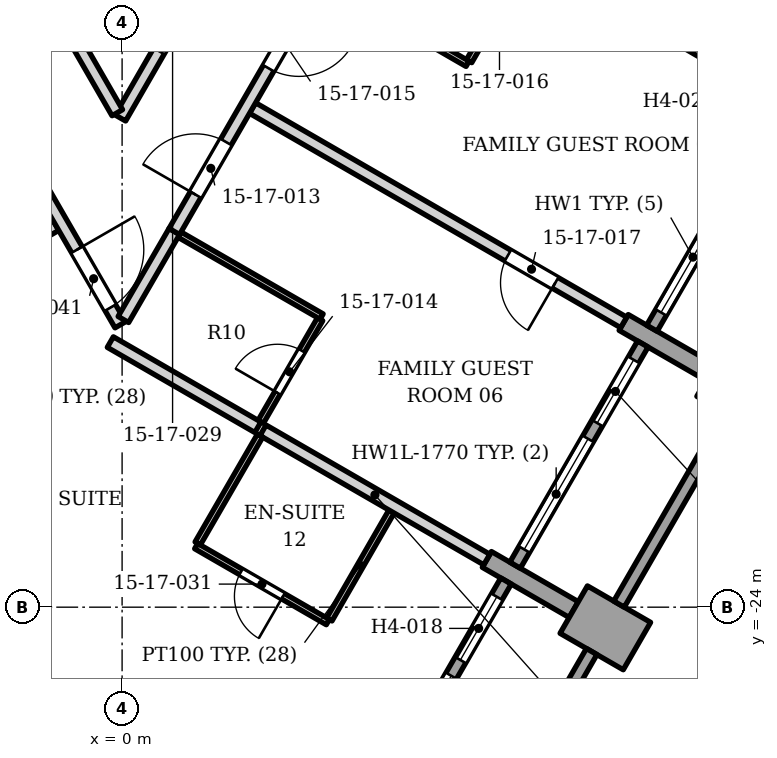
"""IFC4 building model, lengths in metres.
Left out: names, types, materials, properties, quantities, classifications, styles, units other than length and angle.
Written with IfcOpenShell. Run it as: python <this file> out.ifc"""

import sys

from ifc_helpers import new_model, si_unit, direction, frame, frame_2d, origin, origin_2d, place, context, subcontext, project, spatial, polyline, rectangle, outline, extrude, element, fill, save


model = new_model("IFC4")
c1 = context("Model", 3, precision=1e-05, world=origin(), true_north=direction((0.0, 1.0)))
c2 = subcontext(c1, "Body", "Model", "MODEL_VIEW")
j1 = project(units=[si_unit("LENGTHUNIT", "METRE"), si_unit("PLANEANGLEUNIT", "RADIAN")], contexts=[c1])
p1 = place(None, origin())
s1 = spatial("IfcSite", under=j1, at=p1, CompositionType="ELEMENT")
p2 = place(p1, origin())
s2 = spatial("IfcBuilding", under=s1, at=p2, CompositionType="ELEMENT")
p3 = place(p2, frame((0.0, 0.0, 76.6)))
s3 = spatial("IfcBuildingStorey", under=s2, at=p3, CompositionType="ELEMENT", Elevation=76.6)
p4 = place(p3, frame((10.197, -20.443, 0.0), z_axis=(0.0, 0.0, 1.0), x_axis=(0.5, 0.866025403784, 0.0)))
e1 = element("IfcColumn", 1, at=p4, inside=s3, PredefinedType="COLUMN", context=c2, shape_type="SweptSolid", body=[
    extrude(rectangle(XDim=0.9, YDim=1.2, at=origin_2d()), origin(), (0.0, 0.0, 1.0), 3.4),
])
p5 = place(p3, frame((8.467, -24.64, 0.0), z_axis=(0.0, 0.0, 1.0), x_axis=(-0.865955154139, 0.50012165622, 0.0)))
e2 = element("IfcWall", 2, at=p5, inside=s3, PredefinedType="SOLIDWALL", context=c2, shape_type="SweptSolid", body=[
    extrude(rectangle(XDim=1.2, YDim=0.9, at=frame_2d((0.6, 0.0))), origin(), (0.0, 0.0, 1.0), 2.63),
])
p6 = place(p3, frame((7.428, -24.04, 0.0), z_axis=(0.0, 0.0, 1.0), x_axis=(-0.866040211805, 0.499974350878, 0.0)))
e3 = element("IfcWall", 3, at=p6, inside=s3, PredefinedType="SOLIDWALL", context=c2, shape_type="SweptSolid", body=[
    extrude(rectangle(XDim=1.65, YDim=0.3, at=frame_2d((0.825, 0.0))), origin(), (0.0, 0.0, 1.0), 2.473),
])
p7 = place(p3, frame((9.678, -20.143, 0.0), z_axis=(0.0, 0.0, 1.0), x_axis=(-0.866003217194, 0.500038426333, 0.0)))
e4 = element("IfcWall", 4, at=p7, inside=s3, PredefinedType="SOLIDWALL", context=c2, shape_type="SweptSolid", body=[
    extrude(rectangle(XDim=1.65, YDim=0.3, at=frame_2d((0.825, 0.0))), origin(), (0.0, 0.0, 1.0), 2.628),
])
p8 = place(p3, frame((5.922, -27.847, 0.0), z_axis=(0.0, 0.0, 1.0), x_axis=(0.500012057535, 0.866018442252, 0.0)))
e5 = element("IfcWall", 5, at=p8, inside=s3, PredefinedType="SOLIDWALL", context=c2, shape_type="SweptSolid", body=[
    extrude(rectangle(XDim=3.6, YDim=0.2, at=frame_2d((1.8, 0.0))), origin(), (0.0, 0.0, 1.0), 2.63),
])
p9 = place(p3, frame((4.214, -27.207, 0.0), z_axis=(0.0, 0.0, 1.0), x_axis=(0.500027713859, 0.866009402589, 0.0)))
e6 = element("IfcWall", 6, at=p9, inside=s3, PredefinedType="ELEMENTEDWALL", context=c2, shape_type="SweptSolid", body=[
    extrude(rectangle(XDim=4.2, YDim=0.2, at=frame_2d((2.1, 0.0))), origin(), (0.0, 0.0, 1.0), 2.45),
])
p10 = place(p9, frame((0.3, 0.0, 0.6)))
e7 = element("IfcOpeningElement", 7, at=p10, cuts=e6, PredefinedType="OPENING", context=c2, shape_type="SweptSolid", body=[
    extrude(rectangle(XDim=2.1, YDim=1.75, at=frame_2d((1.05, 0.875))), frame((0.0, 0.11, 0.0), z_axis=(0.0, -1.0, 0.0), x_axis=(1.0, 0.0, 0.0)), (0.0, 0.0, 1.0), 0.22),
])
p11 = place(p9, frame((2.7, 0.0, 0.0)))
e8 = element("IfcOpeningElement", 8, at=p11, cuts=e6, PredefinedType="OPENING", context=c2, shape_type="SweptSolid", body=[
    extrude(rectangle(XDim=1.2, YDim=2.35, at=frame_2d((0.6, 1.175))), frame((0.0, 0.11, 0.0), z_axis=(0.0, -1.0, 0.0), x_axis=(1.0, 0.0, 0.0)), (0.0, 0.0, 1.0), 0.22),
])
p12 = place(p3, origin())
e9 = element("IfcWall", 9, at=p12, inside=s3, PredefinedType="SOLIDWALL", context=c2, shape_type="SweptSolid", body=[
    extrude(outline(polyline([(8.259, -24.0), (10.059, -20.883), (9.885, -20.783), (8.086, -23.9), (8.259, -24.0)])), origin(), (0.0, 0.0, 1.0), 2.63),
])
p13 = place(p3, frame((6.464, -23.31, 0.0), z_axis=(0.0, 0.0, 1.0), x_axis=(0.500002543286, 0.866023935413, 0.0)))
e10 = element("IfcWall", 10, at=p13, inside=s3, PredefinedType="ELEMENTEDWALL", context=c2, shape_type="SweptSolid", body=[
    extrude(rectangle(XDim=4.2, YDim=0.2, at=frame_2d((2.1, 0.0))), origin(), (0.0, 0.0, 1.0), 2.473),
])
p14 = place(p13, frame((0.3, 0.0, 0.6)))
e11 = element("IfcOpeningElement", 11, at=p14, cuts=e10, PredefinedType="OPENING", context=c2, shape_type="SweptSolid", body=[
    extrude(rectangle(XDim=2.1, YDim=1.77, at=frame_2d((1.05, 0.885))), frame((0.0, 0.11, 0.0), z_axis=(0.0, -1.0, 0.0), x_axis=(1.0, 0.0, 0.0)), (0.0, 0.0, 1.0), 0.22),
])
p15 = place(p13, frame((2.7, 0.0, 0.0)))
e12 = element("IfcOpeningElement", 12, at=p15, cuts=e10, PredefinedType="OPENING", context=c2, shape_type="SweptSolid", body=[
    extrude(rectangle(XDim=1.2, YDim=2.37, at=frame_2d((0.6, 1.185))), frame((0.0, 0.11, 0.0), z_axis=(0.0, -1.0, 0.0), x_axis=(1.0, 0.0, 0.0)), (0.0, 0.0, 1.0), 0.22),
])
p16 = place(p3, frame((8.714, -19.413, 0.0), z_axis=(0.0, 0.0, 1.0), x_axis=(0.500027713859, 0.866009402589, 0.0)))
e13 = element("IfcWall", 13, at=p16, inside=s3, PredefinedType="ELEMENTEDWALL", context=c2, shape_type="SweptSolid", body=[
    extrude(rectangle(XDim=4.2, YDim=0.2, at=frame_2d((2.1, 0.0))), origin(), (0.0, 0.0, 1.0), 2.628),
])
p17 = place(p16, frame((0.3, 0.0, 0.6)))
e14 = element("IfcOpeningElement", 14, at=p17, cuts=e13, PredefinedType="OPENING", context=c2, shape_type="SweptSolid", body=[
    extrude(rectangle(XDim=2.1, YDim=1.8, at=frame_2d((1.05, 0.9))), frame((0.0, 0.11, 0.0), z_axis=(0.0, -1.0, 0.0), x_axis=(1.0, 0.0, 0.0)), (0.0, 0.0, 1.0), 0.22),
])
p18 = place(p16, frame((2.7, 0.0, 0.0)))
e15 = element("IfcOpeningElement", 15, at=p18, cuts=e13, PredefinedType="OPENING", context=c2, shape_type="SweptSolid", body=[
    extrude(rectangle(XDim=1.2, YDim=2.4, at=frame_2d((0.6, 1.2))), frame((0.0, 0.11, 0.0), z_axis=(0.0, -1.0, 0.0), x_axis=(1.0, 0.0, 0.0)), (0.0, 0.0, 1.0), 0.22),
])
p19 = place(p3, frame((3.408, -24.202, 0.0), z_axis=(0.0, 0.0, 1.0), x_axis=(0.499303169309, 0.866427345551, 0.0)))
e16 = element("IfcWall", 16, at=p19, inside=s3, PredefinedType="PARTITIONING", context=c2, shape_type="SweptSolid", body=[
    extrude(rectangle(XDim=2.05, YDim=0.1, at=frame_2d((1.025, 0.0))), origin(), (0.0, 0.0, 1.0), 2.384),
])
p20 = place(p3, frame((2.317, -21.091, 0.0), z_axis=(0.0, 0.0, 1.0), x_axis=(0.866014341725, -0.50001915956, 0.0)))
e17 = element("IfcWall", 17, at=p20, inside=s3, PredefinedType="PARTITIONING", context=c2, shape_type="SweptSolid", body=[
    extrude(rectangle(XDim=4.25, YDim=0.2, at=frame_2d((2.125, 0.0))), origin(), (0.0, 0.0, 1.0), 2.384),
])
p21 = place(p3, frame((1.218, -22.995, 0.0), z_axis=(0.0, 0.0, 1.0), x_axis=(0.866047370643, -0.499961950354, 0.0)))
e18 = element("IfcWall", 18, at=p21, inside=s3, PredefinedType="PARTITIONING", context=c2, shape_type="SweptSolid", body=[
    extrude(rectangle(XDim=2.5, YDim=0.1, at=frame_2d((1.25, 0.0))), origin(), (0.0, 0.0, 1.0), 2.384),
])
p22 = place(p21, frame((0.85, 0.0, 0.0)))
e19 = element("IfcOpeningElement", 19, at=p22, cuts=e18, PredefinedType="OPENING", context=c2, shape_type="SweptSolid", body=[
    extrude(rectangle(XDim=0.8, YDim=2.1, at=frame_2d((0.4, 1.05))), frame((0.0, 0.06, 0.0), z_axis=(0.0, -1.0, 0.0), x_axis=(1.0, 0.0, 0.0)), (0.0, 0.0, 1.0), 0.12),
])
p23 = place(p3, frame((1.243, -22.952, 0.0), z_axis=(0.0, 0.0, 1.0), x_axis=(0.500646589026, 0.865651773461, 0.0)))
e20 = element("IfcWall", 20, at=p23, inside=s3, PredefinedType="PARTITIONING", context=c2, shape_type="SweptSolid", body=[
    extrude(rectangle(XDim=2.05, YDim=0.1, at=frame_2d((1.025, 0.0))), origin(), (0.0, 0.0, 1.0), 2.384),
])
p24 = place(p3, frame((2.28, -20.952, 0.0), z_axis=(0.0, 0.0, 1.0), x_axis=(0.500675951608, 0.865634791053, 0.0)))
e21 = element("IfcWall", 21, at=p24, inside=s3, PredefinedType="PARTITIONING", context=c2, shape_type="SweptSolid", body=[
    extrude(rectangle(XDim=1.95, YDim=0.1, at=frame_2d((0.975, 0.0))), origin(), (0.0, 0.0, 1.0), 2.384),
])
p25 = place(p24, frame((0.55, 0.0, 0.0)))
e22 = element("IfcOpeningElement", 22, at=p25, cuts=e21, PredefinedType="OPENING", context=c2, shape_type="SweptSolid", body=[
    extrude(rectangle(XDim=0.8, YDim=2.1, at=frame_2d((0.4, 1.05))), frame((0.0, 0.06, 0.0), z_axis=(0.0, -1.0, 0.0), x_axis=(1.0, 0.0, 0.0)), (0.0, 0.0, 1.0), 0.12),
])
p26 = place(p3, frame((-5.81, -20.441, 0.0), z_axis=(0.0, 0.0, 1.0), x_axis=(0.866020710281, 0.500008129298, 0.0)))
e23 = element("IfcWall", 23, at=p26, inside=s3, PredefinedType="PARTITIONING", context=c2, shape_type="SweptSolid", body=[
    extrude(rectangle(XDim=5.45, YDim=0.2, at=frame_2d((2.725, 0.0))), origin(), (0.0, 0.0, 1.0), 2.384),
])
p27 = place(p3, frame((-0.193, -19.64, 0.0), z_axis=(0.0, 0.0, 1.0), x_axis=(0.866036131362, -0.49998141883, 0.0)))
e24 = element("IfcWall", 24, at=p27, inside=s3, PredefinedType="PARTITIONING", context=c2, shape_type="SweptSolid", body=[
    extrude(rectangle(XDim=2.802, YDim=0.2, at=frame_2d((1.401, 0.0))), origin(), (0.0, 0.0, 1.0), 2.384),
])
p28 = place(p3, frame((-11.206, 0.0, 0.0), z_axis=(0.0, 0.0, 1.0), x_axis=(0.500002959525, -0.866023695095, 0.0)))
e25 = element("IfcWall", 25, at=p28, inside=s3, PredefinedType="PARTITIONING", context=c2, shape_type="SweptSolid", body=[
    extrude(rectangle(XDim=22.351, YDim=0.2, at=frame_2d((11.175, 0.0))), origin(), (0.0, 0.0, 1.0), 2.242),
])
p29 = place(p28, frame((0.7, 0.0, 0.0)))
e26 = element("IfcOpeningElement", 26, at=p29, cuts=e25, PredefinedType="OPENING", context=c2, shape_type="SweptSolid", body=[
    extrude(rectangle(XDim=1.0, YDim=2.1, at=frame_2d((0.5, 1.05))), frame((0.0, 0.11, 0.0), z_axis=(0.0, -1.0, 0.0), x_axis=(1.0, 0.0, 0.0)), (0.0, 0.0, 1.0), 0.22),
])
p30 = place(p28, frame((3.1, 0.0, 0.0)))
e27 = element("IfcOpeningElement", 27, at=p30, cuts=e25, PredefinedType="OPENING", context=c2, shape_type="SweptSolid", body=[
    extrude(rectangle(XDim=1.0, YDim=2.1, at=frame_2d((0.5, 1.05))), frame((0.0, 0.11, 0.0), z_axis=(0.0, -1.0, 0.0), x_axis=(1.0, 0.0, 0.0)), (0.0, 0.0, 1.0), 0.22),
])
p31 = place(p28, frame((9.7, 0.0, 0.0)))
e28 = element("IfcOpeningElement", 28, at=p31, cuts=e25, PredefinedType="OPENING", context=c2, shape_type="SweptSolid", body=[
    extrude(rectangle(XDim=1.0, YDim=2.1, at=frame_2d((0.5, 1.05))), frame((0.0, 0.11, 0.0), z_axis=(0.0, -1.0, 0.0), x_axis=(1.0, 0.0, 0.0)), (0.0, 0.0, 1.0), 0.22),
])
p32 = place(p28, frame((12.1, 0.0, 0.0)))
e29 = element("IfcOpeningElement", 29, at=p32, cuts=e25, PredefinedType="OPENING", context=c2, shape_type="SweptSolid", body=[
    extrude(rectangle(XDim=1.0, YDim=2.1, at=frame_2d((0.5, 1.05))), frame((0.0, 0.11, 0.0), z_axis=(0.0, -1.0, 0.0), x_axis=(1.0, 0.0, 0.0)), (0.0, 0.0, 1.0), 0.22),
])
p33 = place(p28, frame((16.4, 0.0, 0.0)))
e30 = element("IfcOpeningElement", 30, at=p33, cuts=e25, PredefinedType="OPENING", context=c2, shape_type="SweptSolid", body=[
    extrude(rectangle(XDim=1.1, YDim=2.1, at=frame_2d((0.55, 1.05))), frame((0.0, 0.11, 0.0), z_axis=(0.0, -1.0, 0.0), x_axis=(1.0, 0.0, 0.0)), (0.0, 0.0, 1.0), 0.22),
])
p34 = place(p28, frame((20.925, 0.0, 0.0)))
e31 = element("IfcOpeningElement", 31, at=p34, cuts=e25, PredefinedType="OPENING", context=c2, shape_type="SweptSolid", body=[
    extrude(rectangle(XDim=1.1, YDim=2.1, at=frame_2d((0.55, 1.05))), frame((0.0, 0.11, 0.0), z_axis=(0.0, -1.0, 0.0), x_axis=(1.0, 0.0, 0.0)), (0.0, 0.0, 1.0), 0.22),
])
p35 = place(p3, frame((0.943, -17.873, 0.0), z_axis=(0.0, 0.0, 1.0), x_axis=(0.866339109022, -0.499456252518, 0.0)))
e32 = element("IfcWall", 32, at=p35, inside=s3, PredefinedType="PARTITIONING", context=c2, shape_type="SweptSolid", body=[
    extrude(rectangle(XDim=2.7, YDim=0.1, at=frame_2d((1.35, 0.0))), origin(), (0.0, 0.0, 1.0), 2.384),
])
p36 = place(p3, frame((0.021, -19.269, 0.0), z_axis=(0.0, 0.0, 1.0), x_axis=(0.501053540398, 0.865416286913, 0.0)))
e33 = element("IfcWall", 33, at=p36, inside=s3, PredefinedType="PARTITIONING", context=c2, shape_type="SweptSolid", body=[
    extrude(rectangle(XDim=1.672, YDim=0.2, at=frame_2d((0.836, 0.0))), origin(), (0.0, 0.0, 1.0), 2.473),
])
p37 = place(p3, frame((-0.029, -15.955, 0.0), z_axis=(0.0, 0.0, 1.0), x_axis=(0.499541892375, 0.866289730842, 0.0)))
e34 = element("IfcWall", 34, at=p37, inside=s3, PredefinedType="PARTITIONING", context=c2, shape_type="SweptSolid", body=[
    extrude(rectangle(XDim=13.93, YDim=0.2, at=frame_2d((6.965, 0.0))), origin(), (0.0, 0.0, 1.0), 2.242),
])
p38 = place(p37, frame((1.27, 0.0, 0.0)))
e35 = element("IfcOpeningElement", 35, at=p38, cuts=e34, PredefinedType="OPENING", context=c2, shape_type="SweptSolid", body=[
    extrude(rectangle(XDim=0.9, YDim=2.1, at=frame_2d((0.45, 1.05))), frame((0.0, 0.11, 0.0), z_axis=(0.0, -1.0, 0.0), x_axis=(1.0, 0.0, 0.0)), (0.0, 0.0, 1.0), 0.22),
])
p39 = place(p37, frame((8.235, 0.0, 0.0)))
e36 = element("IfcOpeningElement", 36, at=p39, cuts=e34, PredefinedType="OPENING", context=c2, shape_type="SweptSolid", body=[
    extrude(rectangle(XDim=0.9, YDim=2.1, at=frame_2d((0.45, 1.05))), frame((0.0, 0.11, 0.0), z_axis=(0.0, -1.0, 0.0), x_axis=(1.0, 0.0, 0.0)), (0.0, 0.0, 1.0), 0.22),
])
p40 = place(p3, frame((2.145, -15.791, 0.0), z_axis=(0.0, 0.0, 1.0), x_axis=(0.865906406618, -0.500206052519, 0.0)))
e37 = element("IfcWall", 37, at=p40, inside=s3, PredefinedType="PARTITIONING", context=c2, shape_type="SweptSolid", body=[
    extrude(rectangle(XDim=7.05, YDim=0.2, at=frame_2d((3.525, 0.0))), origin(), (0.0, 0.0, 1.0), 2.384),
])
p41 = place(p40, frame((4.85, 0.0, 0.0)))
e38 = element("IfcOpeningElement", 38, at=p41, cuts=e37, PredefinedType="OPENING", context=c2, shape_type="SweptSolid", body=[
    extrude(rectangle(XDim=0.9, YDim=2.1, at=frame_2d((0.45, 1.05))), frame((0.0, 0.11, 0.0), z_axis=(0.0, -1.0, 0.0), x_axis=(1.0, 0.0, 0.0)), (0.0, 0.0, 1.0), 0.22),
])
p42 = place(p3, frame((5.707, -15.021, 0.0), z_axis=(0.0, 0.0, 1.0), x_axis=(0.49995005938, 0.866054235095, 0.0)))
e39 = element("IfcWall", 39, at=p42, inside=s3, PredefinedType="PARTITIONING", context=c2, shape_type="SweptSolid", body=[
    extrude(rectangle(XDim=1.95, YDim=0.1, at=frame_2d((0.975, 0.0))), origin(), (0.0, 0.0, 1.0), 2.473),
])
p43 = place(p42, frame((0.6, 0.0, 0.0)))
e40 = element("IfcOpeningElement", 40, at=p43, cuts=e39, PredefinedType="OPENING", context=c2, shape_type="SweptSolid", body=[
    extrude(rectangle(XDim=0.8, YDim=2.1, at=frame_2d((0.4, 1.05))), frame((0.0, 0.06, 0.0), z_axis=(0.0, -1.0, 0.0), x_axis=(1.0, 0.0, 0.0)), (0.0, 0.0, 1.0), 0.12),
])
p44 = place(p3, frame((3.344, -13.713, 0.0), z_axis=(0.0, 0.0, 1.0), x_axis=(0.86571095196, -0.500544251447, 0.0)))
e41 = element("IfcWall", 41, at=p44, inside=s3, PredefinedType="PARTITIONING", context=c2, shape_type="SweptSolid", body=[
    extrude(rectangle(XDim=2.7, YDim=0.1, at=frame_2d((1.35, 0.0))), origin(), (0.0, 0.0, 1.0), 2.384),
])
p45 = place(p3, frame((4.395, -11.894, 0.0), z_axis=(0.0, 0.0, 1.0), x_axis=(0.866031034943, -0.499990246421, 0.0)))
e42 = element("IfcWall", 42, at=p45, inside=s3, PredefinedType="PARTITIONING", context=c2, shape_type="SweptSolid", body=[
    extrude(rectangle(XDim=7.05, YDim=0.2, at=frame_2d((3.525, 0.0))), origin(), (0.0, 0.0, 1.0), 2.302),
])
p46 = place(p3, frame((-6.991, -3.893, 0.0), z_axis=(0.0, 0.0, 1.0), x_axis=(0.499865112403, -0.86610326717, 0.0)))
e43 = element("IfcWall", 43, at=p46, inside=s3, PredefinedType="PARTITIONING", context=c2, shape_type="SweptSolid", body=[
    extrude(rectangle(XDim=13.827, YDim=0.2, at=frame_2d((6.914, 0.0))), origin(), (0.0, 0.0, 1.0), 2.242),
])
p47 = place(p46, frame((5.377, 0.0, 0.0)))
e44 = element("IfcOpeningElement", 44, at=p47, cuts=e43, PredefinedType="OPENING", context=c2, shape_type="SweptSolid", body=[
    extrude(rectangle(XDim=0.9, YDim=2.1, at=frame_2d((0.45, 1.05))), frame((0.0, 0.11, 0.0), z_axis=(0.0, -1.0, 0.0), x_axis=(1.0, 0.0, 0.0)), (0.0, 0.0, 1.0), 0.22),
])
p48 = place(p3, frame((0.859, -17.822, 0.0), z_axis=(0.0, 0.0, 1.0), x_axis=(0.500002395808, 0.866024020559, 0.0)))
e45 = element("IfcWall", 45, at=p48, inside=s3, PredefinedType="PARTITIONING", context=c2, shape_type="SweptSolid", body=[
    extrude(rectangle(XDim=23.0, YDim=0.2, at=frame_2d((11.5, 0.0))), origin(), (0.0, 0.0, 1.0), 2.242),
])
p49 = place(p48, frame((0.7, 0.0, 0.0)))
e46 = element("IfcOpeningElement", 46, at=p49, cuts=e45, PredefinedType="OPENING", context=c2, shape_type="SweptSolid", body=[
    extrude(rectangle(XDim=1.0, YDim=2.1, at=frame_2d((0.5, 1.05))), frame((0.0, 0.11, 0.0), z_axis=(0.0, -1.0, 0.0), x_axis=(1.0, 0.0, 0.0)), (0.0, 0.0, 1.0), 0.22),
])
p50 = place(p48, frame((3.1, 0.0, 0.0)))
e47 = element("IfcOpeningElement", 47, at=p50, cuts=e45, PredefinedType="OPENING", context=c2, shape_type="SweptSolid", body=[
    extrude(rectangle(XDim=1.0, YDim=2.1, at=frame_2d((0.5, 1.05))), frame((0.0, 0.11, 0.0), z_axis=(0.0, -1.0, 0.0), x_axis=(1.0, 0.0, 0.0)), (0.0, 0.0, 1.0), 0.22),
])
p51 = place(p48, frame((9.7, 0.0, 0.0)))
e48 = element("IfcOpeningElement", 48, at=p51, cuts=e45, PredefinedType="OPENING", context=c2, shape_type="SweptSolid", body=[
    extrude(rectangle(XDim=1.0, YDim=2.1, at=frame_2d((0.5, 1.05))), frame((0.0, 0.11, 0.0), z_axis=(0.0, -1.0, 0.0), x_axis=(1.0, 0.0, 0.0)), (0.0, 0.0, 1.0), 0.22),
])
p52 = place(p48, frame((12.1, 0.0, 0.0)))
e49 = element("IfcOpeningElement", 49, at=p52, cuts=e45, PredefinedType="OPENING", context=c2, shape_type="SweptSolid", body=[
    extrude(rectangle(XDim=1.0, YDim=2.1, at=frame_2d((0.5, 1.05))), frame((0.0, 0.11, 0.0), z_axis=(0.0, -1.0, 0.0), x_axis=(1.0, 0.0, 0.0)), (0.0, 0.0, 1.0), 0.22),
])
p53 = place(p48, frame((16.6, 0.0, 0.0)))
e50 = element("IfcOpeningElement", 50, at=p53, cuts=e45, PredefinedType="OPENING", context=c2, shape_type="SweptSolid", body=[
    extrude(rectangle(XDim=1.0, YDim=2.1, at=frame_2d((0.5, 1.05))), frame((0.0, 0.11, 0.0), z_axis=(0.0, -1.0, 0.0), x_axis=(1.0, 0.0, 0.0)), (0.0, 0.0, 1.0), 0.22),
])
p54 = place(p10, origin())
e51 = element("IfcWindow", 51, at=p54, inside=s3, PartitioningType="SINGLE_PANEL", PredefinedType="WINDOW", context=c2, shape_type="SweptSolid", body=[
    extrude(rectangle(XDim=2.1, YDim=1.75, at=frame_2d((1.05, 0.875))), frame((0.0, 0.03, 0.0), z_axis=(0.0, -1.0, 0.0), x_axis=(1.0, 0.0, 0.0)), (0.0, 0.0, 1.0), 0.06),
])
fill(e7, e51)
p55 = place(p11, origin())
e52 = element("IfcDoor", 52, at=p55, inside=s3, OperationType="SINGLE_SWING_LEFT", PredefinedType="DOOR", context=c2, shape_type="SweptSolid", body=[
    extrude(rectangle(XDim=1.2, YDim=2.35, at=frame_2d((0.6, 1.175))), frame((0.0, 0.025, 0.0), z_axis=(0.0, -1.0, 0.0), x_axis=(1.0, 0.0, 0.0)), (0.0, 0.0, 1.0), 0.05),
])
fill(e8, e52)
p56 = place(p14, origin())
e53 = element("IfcWindow", 53, at=p56, inside=s3, PartitioningType="SINGLE_PANEL", PredefinedType="WINDOW", context=c2, shape_type="SweptSolid", body=[
    extrude(rectangle(XDim=2.1, YDim=1.77, at=frame_2d((1.05, 0.885))), frame((0.0, 0.03, 0.0), z_axis=(0.0, -1.0, 0.0), x_axis=(1.0, 0.0, 0.0)), (0.0, 0.0, 1.0), 0.06),
])
fill(e11, e53)
p57 = place(p15, origin())
e54 = element("IfcDoor", 54, at=p57, inside=s3, OperationType="SINGLE_SWING_LEFT", PredefinedType="DOOR", context=c2, shape_type="SweptSolid", body=[
    extrude(rectangle(XDim=1.2, YDim=2.37, at=frame_2d((0.6, 1.185))), frame((0.0, 0.025, 0.0), z_axis=(0.0, -1.0, 0.0), x_axis=(1.0, 0.0, 0.0)), (0.0, 0.0, 1.0), 0.05),
])
fill(e12, e54)
p58 = place(p17, origin())
e55 = element("IfcWindow", 55, at=p58, inside=s3, PartitioningType="SINGLE_PANEL", PredefinedType="WINDOW", context=c2, shape_type="SweptSolid", body=[
    extrude(rectangle(XDim=2.1, YDim=1.8, at=frame_2d((1.05, 0.9))), frame((0.0, 0.03, 0.0), z_axis=(0.0, -1.0, 0.0), x_axis=(1.0, 0.0, 0.0)), (0.0, 0.0, 1.0), 0.06),
])
fill(e14, e55)
p59 = place(p49, origin())
e56 = element("IfcDoor", 56, at=p59, inside=s3, OperationType="SINGLE_SWING_LEFT", PredefinedType="DOOR", context=c2, shape_type="SweptSolid", body=[
    extrude(rectangle(XDim=1.0, YDim=2.1, at=frame_2d((0.5, 1.05))), frame((0.0, 0.025, 0.0), z_axis=(0.0, -1.0, 0.0), x_axis=(1.0, 0.0, 0.0)), (0.0, 0.0, 1.0), 0.05),
])
fill(e46, e56)
p60 = place(p25, origin())
e57 = element("IfcDoor", 57, at=p60, inside=s3, OperationType="SINGLE_SWING_LEFT", PredefinedType="DOOR", context=c2, shape_type="SweptSolid", body=[
    extrude(rectangle(XDim=0.8, YDim=2.1, at=frame_2d((0.4, 1.05))), frame((0.0, 0.025, 0.0), z_axis=(0.0, -1.0, 0.0), x_axis=(1.0, 0.0, 0.0)), (0.0, 0.0, 1.0), 0.05),
])
fill(e22, e57)
p61 = place(p50, origin())
e58 = element("IfcDoor", 58, at=p61, inside=s3, OperationType="SINGLE_SWING_RIGHT", PredefinedType="DOOR", context=c2, shape_type="SweptSolid", body=[
    extrude(rectangle(XDim=1.0, YDim=2.1, at=frame_2d((0.5, 1.05))), frame((0.0, 0.025, 0.0), z_axis=(0.0, -1.0, 0.0), x_axis=(1.0, 0.0, 0.0)), (0.0, 0.0, 1.0), 0.05),
])
fill(e47, e58)
p62 = place(p41, origin())
e59 = element("IfcDoor", 59, at=p62, inside=s3, OperationType="SINGLE_SWING_RIGHT", PredefinedType="DOOR", context=c2, shape_type="SweptSolid", body=[
    extrude(rectangle(XDim=0.9, YDim=2.1, at=frame_2d((0.45, 1.05))), frame((0.0, 0.025, 0.0), z_axis=(0.0, -1.0, 0.0), x_axis=(1.0, 0.0, 0.0)), (0.0, 0.0, 1.0), 0.05),
])
fill(e38, e59)
p63 = place(p22, origin())
e60 = element("IfcDoor", 60, at=p63, inside=s3, OperationType="SINGLE_SWING_RIGHT", PredefinedType="DOOR", context=c2, shape_type="SweptSolid", body=[
    extrude(rectangle(XDim=0.8, YDim=2.1, at=frame_2d((0.4, 1.05))), frame((0.0, 0.025, 0.0), z_axis=(0.0, -1.0, 0.0), x_axis=(1.0, 0.0, 0.0)), (0.0, 0.0, 1.0), 0.05),
])
fill(e19, e60)
p64 = place(p34, origin())
e61 = element("IfcDoor", 61, at=p64, inside=s3, OperationType="SINGLE_SWING_LEFT", PredefinedType="DOOR", context=c2, shape_type="SweptSolid", body=[
    extrude(rectangle(XDim=1.1, YDim=2.1, at=frame_2d((0.55, 1.05))), frame((0.0, 0.025, 0.0), z_axis=(0.0, -1.0, 0.0), x_axis=(1.0, 0.0, 0.0)), (0.0, 0.0, 1.0), 0.05),
])
fill(e31, e61)
save(model, sys.argv[1])
